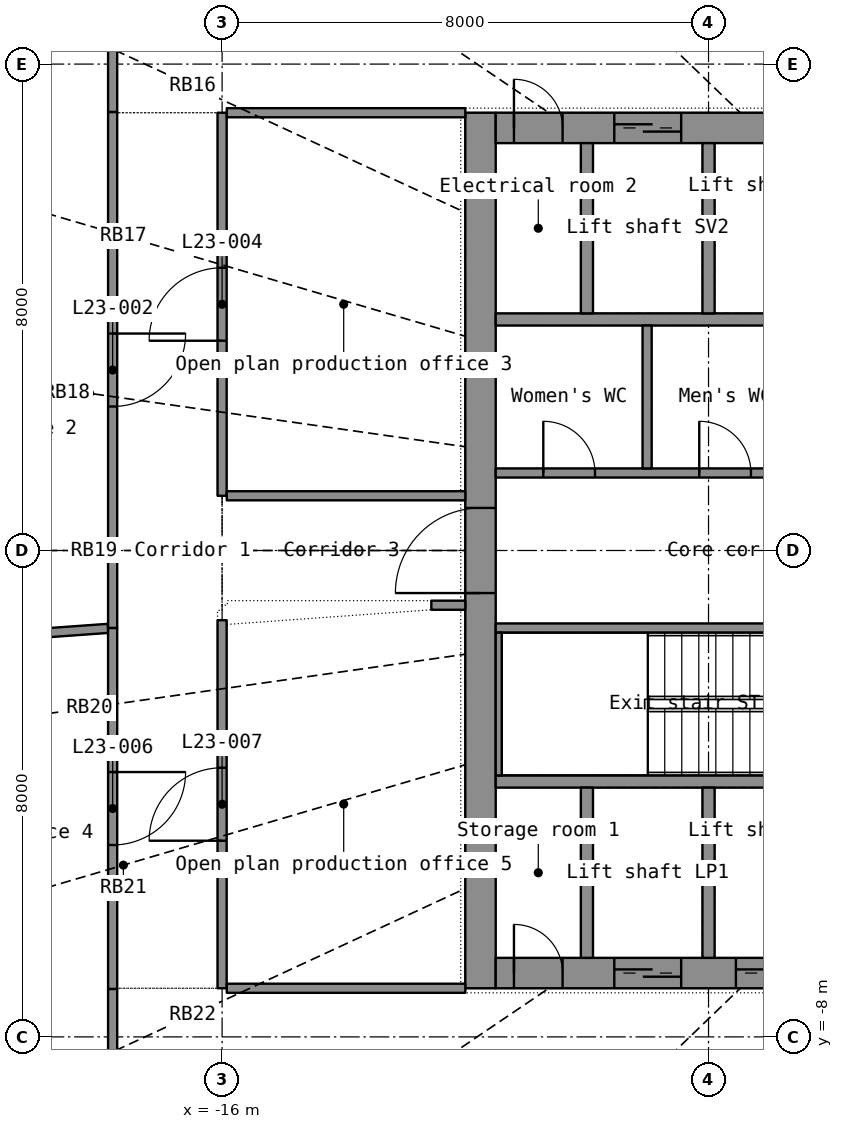
"""IFC4 building model, lengths in metres.
Left out: names, types, materials, properties, quantities, classifications, styles, units other than length and angle.
Written with IfcOpenShell. Run it as: python <this file> out.ifc"""

import sys

from ifc_helpers import new_model, si_unit, direction, frame, frame_2d, origin, place, context, subcontext, project, spatial, rectangle, extrude, element, fill, save


model = new_model("IFC4")
c1 = context("Model", 3, precision=1e-05, world=origin(), true_north=direction((0.0, 1.0)))
c2 = subcontext(c1, "Body", "Model", "MODEL_VIEW")
j1 = project(units=[si_unit("LENGTHUNIT", "METRE"), si_unit("PLANEANGLEUNIT", "RADIAN")], contexts=[c1])
p1 = place(None, origin())
s1 = spatial("IfcSite", under=j1, at=p1, CompositionType="ELEMENT")
p2 = place(p1, origin())
s2 = spatial("IfcBuilding", under=s1, at=p2, CompositionType="ELEMENT")
p3 = place(p2, frame((0.0, 0.0, 100.8)))
s3 = spatial("IfcBuildingStorey", under=s2, at=p3, CompositionType="ELEMENT", Elevation=100.8)
p4 = place(p3, frame((-11.75, -7.2, 0.0), z_axis=(0.0, 0.0, 1.0), x_axis=(0.0, 1.0, 0.0)))
e1 = element("IfcWall", 1, at=p4, inside=s3, PredefinedType="SHEAR", context=c2, shape_type="SweptSolid", body=[
    extrude(rectangle(XDim=14.4, YDim=0.5, at=frame_2d((7.2, 0.0))), origin(), (0.0, 0.0, 1.0), 3.3),
])
p5 = place(p4, frame((6.5, 0.0, 0.0)))
e2 = element("IfcOpeningElement", 2, at=p5, cuts=e1, PredefinedType="OPENING", context=c2, shape_type="SweptSolid", body=[
    extrude(rectangle(XDim=1.4, YDim=2.2, at=frame_2d((0.7, 1.1))), frame((0.0, 0.26, 0.0), z_axis=(0.0, -1.0, 0.0), x_axis=(1.0, 0.0, 0.0)), (0.0, 0.0, 1.0), 0.52),
])
p6 = place(p3, frame((-11.5, -6.95, 0.0), z_axis=(0.0, 0.0, 1.0), x_axis=(1.0, 0.0, 0.0)))
e3 = element("IfcWall", 3, at=p6, inside=s3, PredefinedType="SHEAR", context=c2, shape_type="SweptSolid", body=[
    extrude(rectangle(XDim=23.0, YDim=0.5, at=frame_2d((11.5, 0.0))), origin(), (0.0, 0.0, 1.0), 3.3),
])
p7 = place(p6, frame((1.95, 0.0, 0.0)))
e4 = element("IfcOpeningElement", 4, at=p7, cuts=e3, PredefinedType="OPENING", context=c2, shape_type="SweptSolid", body=[
    extrude(rectangle(XDim=1.1, YDim=2.2, at=frame_2d((0.55, 1.1))), frame((0.0, 0.26, 0.0), z_axis=(0.0, -1.0, 0.0), x_axis=(1.0, 0.0, 0.0)), (0.0, 0.0, 1.0), 0.52),
])
p8 = place(p6, frame((3.95, 0.0, 0.0)))
e5 = element("IfcOpeningElement", 5, at=p8, cuts=e3, PredefinedType="OPENING", context=c2, shape_type="SweptSolid", body=[
    extrude(rectangle(XDim=1.1, YDim=2.2, at=frame_2d((0.55, 1.1))), frame((0.0, 0.26, 0.0), z_axis=(0.0, -1.0, 0.0), x_axis=(1.0, 0.0, 0.0)), (0.0, 0.0, 1.0), 0.52),
])
p9 = place(p6, frame((5.95, 0.0, 0.0)))
e6 = element("IfcOpeningElement", 6, at=p9, cuts=e3, PredefinedType="OPENING", context=c2, shape_type="SweptSolid", body=[
    extrude(rectangle(XDim=1.1, YDim=2.2, at=frame_2d((0.55, 1.1))), frame((0.0, 0.26, 0.0), z_axis=(0.0, -1.0, 0.0), x_axis=(1.0, 0.0, 0.0)), (0.0, 0.0, 1.0), 0.52),
])
p10 = place(p6, frame((7.95, 0.0, 0.0)))
e7 = element("IfcOpeningElement", 7, at=p10, cuts=e3, PredefinedType="OPENING", context=c2, shape_type="SweptSolid", body=[
    extrude(rectangle(XDim=1.1, YDim=2.2, at=frame_2d((0.55, 1.1))), frame((0.0, 0.26, 0.0), z_axis=(0.0, -1.0, 0.0), x_axis=(1.0, 0.0, 0.0)), (0.0, 0.0, 1.0), 0.52),
])
p11 = place(p6, frame((9.95, 0.0, 0.0)))
e8 = element("IfcOpeningElement", 8, at=p11, cuts=e3, PredefinedType="OPENING", context=c2, shape_type="SweptSolid", body=[
    extrude(rectangle(XDim=1.1, YDim=2.2, at=frame_2d((0.55, 1.1))), frame((0.0, 0.26, 0.0), z_axis=(0.0, -1.0, 0.0), x_axis=(1.0, 0.0, 0.0)), (0.0, 0.0, 1.0), 0.52),
])
p12 = place(p6, frame((11.95, 0.0, 0.0)))
e9 = element("IfcOpeningElement", 9, at=p12, cuts=e3, PredefinedType="OPENING", context=c2, shape_type="SweptSolid", body=[
    extrude(rectangle(XDim=1.1, YDim=2.2, at=frame_2d((0.55, 1.1))), frame((0.0, 0.26, 0.0), z_axis=(0.0, -1.0, 0.0), x_axis=(1.0, 0.0, 0.0)), (0.0, 0.0, 1.0), 0.52),
])
p13 = place(p6, frame((13.95, 0.0, 0.0)))
e10 = element("IfcOpeningElement", 10, at=p13, cuts=e3, PredefinedType="OPENING", context=c2, shape_type="SweptSolid", body=[
    extrude(rectangle(XDim=1.1, YDim=2.2, at=frame_2d((0.55, 1.1))), frame((0.0, 0.26, 0.0), z_axis=(0.0, -1.0, 0.0), x_axis=(1.0, 0.0, 0.0)), (0.0, 0.0, 1.0), 0.52),
])
p14 = place(p6, frame((15.95, 0.0, 0.0)))
e11 = element("IfcOpeningElement", 11, at=p14, cuts=e3, PredefinedType="OPENING", context=c2, shape_type="SweptSolid", body=[
    extrude(rectangle(XDim=1.1, YDim=2.2, at=frame_2d((0.55, 1.1))), frame((0.0, 0.26, 0.0), z_axis=(0.0, -1.0, 0.0), x_axis=(1.0, 0.0, 0.0)), (0.0, 0.0, 1.0), 0.52),
])
p15 = place(p6, frame((19.95, 0.0, 0.0)))
e12 = element("IfcOpeningElement", 12, at=p15, cuts=e3, PredefinedType="OPENING", context=c2, shape_type="SweptSolid", body=[
    extrude(rectangle(XDim=1.1, YDim=2.2, at=frame_2d((0.55, 1.1))), frame((0.0, 0.26, 0.0), z_axis=(0.0, -1.0, 0.0), x_axis=(1.0, 0.0, 0.0)), (0.0, 0.0, 1.0), 0.52),
])
p16 = place(p6, frame((0.3, 0.0, 0.0)))
e13 = element("IfcOpeningElement", 13, at=p16, cuts=e3, PredefinedType="OPENING", context=c2, shape_type="SweptSolid", body=[
    extrude(rectangle(XDim=0.8, YDim=2.05, at=frame_2d((0.4, 1.025))), frame((0.0, 0.26, 0.0), z_axis=(0.0, -1.0, 0.0), x_axis=(1.0, 0.0, 0.0)), (0.0, 0.0, 1.0), 0.52),
])
p17 = place(p6, frame((21.9, 0.0, 0.0)))
e14 = element("IfcOpeningElement", 14, at=p17, cuts=e3, PredefinedType="OPENING", context=c2, shape_type="SweptSolid", body=[
    extrude(rectangle(XDim=0.8, YDim=2.05, at=frame_2d((0.4, 1.025))), frame((0.0, 0.26, 0.0), z_axis=(0.0, -1.0, 0.0), x_axis=(1.0, 0.0, 0.0)), (0.0, 0.0, 1.0), 0.52),
])
p18 = place(p3, frame((-11.5, 6.95, 0.0), z_axis=(0.0, 0.0, 1.0), x_axis=(1.0, 0.0, 0.0)))
e15 = element("IfcWall", 15, at=p18, inside=s3, PredefinedType="SHEAR", context=c2, shape_type="SweptSolid", body=[
    extrude(rectangle(XDim=23.0, YDim=0.5, at=frame_2d((11.5, 0.0))), origin(), (0.0, 0.0, 1.0), 3.3),
])
p19 = place(p18, frame((1.95, 0.0, 0.0)))
e16 = element("IfcOpeningElement", 16, at=p19, cuts=e15, PredefinedType="OPENING", context=c2, shape_type="SweptSolid", body=[
    extrude(rectangle(XDim=1.1, YDim=2.2, at=frame_2d((0.55, 1.1))), frame((0.0, 0.26, 0.0), z_axis=(0.0, -1.0, 0.0), x_axis=(1.0, 0.0, 0.0)), (0.0, 0.0, 1.0), 0.52),
])
p20 = place(p18, frame((8.05, 0.0, 0.0)))
e17 = element("IfcOpeningElement", 17, at=p20, cuts=e15, PredefinedType="OPENING", context=c2, shape_type="SweptSolid", body=[
    extrude(rectangle(XDim=0.9, YDim=2.1, at=frame_2d((0.45, 1.05))), frame((0.0, 0.26, 0.0), z_axis=(0.0, -1.0, 0.0), x_axis=(1.0, 0.0, 0.0)), (0.0, 0.0, 1.0), 0.52),
])
p21 = place(p18, frame((16.05, 0.0, 0.0)))
e18 = element("IfcOpeningElement", 18, at=p21, cuts=e15, PredefinedType="OPENING", context=c2, shape_type="SweptSolid", body=[
    extrude(rectangle(XDim=0.9, YDim=2.1, at=frame_2d((0.45, 1.05))), frame((0.0, 0.26, 0.0), z_axis=(0.0, -1.0, 0.0), x_axis=(1.0, 0.0, 0.0)), (0.0, 0.0, 1.0), 0.52),
])
p22 = place(p18, frame((0.3, 0.0, 0.0)))
e19 = element("IfcOpeningElement", 19, at=p22, cuts=e15, PredefinedType="OPENING", context=c2, shape_type="SweptSolid", body=[
    extrude(rectangle(XDim=0.8, YDim=2.05, at=frame_2d((0.4, 1.025))), frame((0.0, 0.26, 0.0), z_axis=(0.0, -1.0, 0.0), x_axis=(1.0, 0.0, 0.0)), (0.0, 0.0, 1.0), 0.52),
])
p23 = place(p18, frame((21.9, 0.0, 0.0)))
e20 = element("IfcOpeningElement", 20, at=p23, cuts=e15, PredefinedType="OPENING", context=c2, shape_type="SweptSolid", body=[
    extrude(rectangle(XDim=0.8, YDim=2.05, at=frame_2d((0.4, 1.025))), frame((0.0, 0.26, 0.0), z_axis=(0.0, -1.0, 0.0), x_axis=(1.0, 0.0, 0.0)), (0.0, 0.0, 1.0), 0.52),
])
for number, where, z_axis, x_axis in (
    (21, (-11.5, -3.8, 0.0), (0.0, 0.0, 1.0), (1.0, 0.0, 0.0)),
    (22, (-11.5, 3.8, 0.0), (0.0, 0.0, 1.0), (1.0, 0.0, 0.0)),
):
    element("IfcWall", number, at=place(p3, frame(where, z_axis=z_axis, x_axis=x_axis)), inside=s3, PredefinedType="SHEAR", context=c2, shape_type="SweptSolid", body=[
        extrude(rectangle(XDim=23.0, YDim=0.2, at=frame_2d((11.5, 0.0))), origin(), (0.0, 0.0, 1.0), 3.3),
    ])
for number, where, z_axis, x_axis in (
    (23, (-10.0, -6.7, 0.0), (0.0, 0.0, 1.0), (0.0, 1.0, 0.0)),
    (24, (-8.0, -6.7, 0.0), (0.0, 0.0, 1.0), (0.0, 1.0, 0.0)),
    (25, (-10.0, 3.9, 0.0), (0.0, 0.0, 1.0), (0.0, 1.0, 0.0)),
    (26, (-8.0, 3.9, 0.0), (0.0, 0.0, 1.0), (0.0, 1.0, 0.0)),
):
    element("IfcWall", number, at=place(p3, frame(where, z_axis=z_axis, x_axis=x_axis)), inside=s3, PredefinedType="SHEAR", context=c2, shape_type="SweptSolid", body=[
        extrude(rectangle(XDim=2.8, YDim=0.2, at=frame_2d((1.4, 0.0))), origin(), (0.0, 0.0, 1.0), 3.3),
    ])
p24 = place(p3, frame((-11.5, -1.275, 0.0), z_axis=(0.0, 0.0, 1.0), x_axis=(1.0, 0.0, 0.0)))
e27 = element("IfcWall", 27, at=p24, inside=s3, PredefinedType="SHEAR", context=c2, shape_type="SweptSolid", body=[
    extrude(rectangle(XDim=8.5, YDim=0.15, at=frame_2d((4.25, 0.0))), origin(), (0.0, 0.0, 1.0), 3.3),
])
p25 = place(p24, frame((5.35, 0.0, 0.0)))
e28 = element("IfcOpeningElement", 28, at=p25, cuts=e27, PredefinedType="OPENING", context=c2, shape_type="SweptSolid", body=[
    extrude(rectangle(XDim=1.1, YDim=2.15, at=frame_2d((0.55, 1.075))), frame((0.0, 0.085, 0.0), z_axis=(0.0, -1.0, 0.0), x_axis=(1.0, 0.0, 0.0)), (0.0, 0.0, 1.0), 0.17),
])
p26 = place(p24, frame((7.15, 0.0, 0.0)))
e29 = element("IfcOpeningElement", 29, at=p26, cuts=e27, PredefinedType="OPENING", context=c2, shape_type="SweptSolid", body=[
    extrude(rectangle(XDim=0.9, YDim=2.1, at=frame_2d((0.45, 1.05))), frame((0.0, 0.085, 0.0), z_axis=(0.0, -1.0, 0.0), x_axis=(1.0, 0.0, 0.0)), (0.0, 0.0, 1.0), 0.17),
])
p27 = place(p3, frame((-11.5, 1.275, 0.0), z_axis=(0.0, 0.0, 1.0), x_axis=(1.0, 0.0, 0.0)))
e30 = element("IfcWall", 30, at=p27, inside=s3, PredefinedType="PARTITIONING", context=c2, shape_type="SweptSolid", body=[
    extrude(rectangle(XDim=8.5, YDim=0.15, at=frame_2d((4.25, 0.0))), origin(), (0.0, 0.0, 1.0), 3.3),
])
p28 = place(p27, frame((0.782, 0.0, 0.0)))
e31 = element("IfcOpeningElement", 31, at=p28, cuts=e30, PredefinedType="OPENING", context=c2, shape_type="SweptSolid", body=[
    extrude(rectangle(XDim=0.85, YDim=2.1, at=frame_2d((0.425, 1.05))), frame((0.0, 0.085, 0.0), z_axis=(0.0, -1.0, 0.0), x_axis=(1.0, 0.0, 0.0)), (0.0, 0.0, 1.0), 0.17),
])
p29 = place(p27, frame((3.347, 0.0, 0.0)))
e32 = element("IfcOpeningElement", 32, at=p29, cuts=e30, PredefinedType="OPENING", context=c2, shape_type="SweptSolid", body=[
    extrude(rectangle(XDim=0.85, YDim=2.1, at=frame_2d((0.425, 1.05))), frame((0.0, 0.085, 0.0), z_axis=(0.0, -1.0, 0.0), x_axis=(1.0, 0.0, 0.0)), (0.0, 0.0, 1.0), 0.17),
])
p30 = place(p27, frame((5.485, 0.0, 0.0)))
e33 = element("IfcOpeningElement", 33, at=p30, cuts=e30, PredefinedType="OPENING", context=c2, shape_type="SweptSolid", body=[
    extrude(rectangle(XDim=0.9, YDim=2.1, at=frame_2d((0.45, 1.05))), frame((0.0, 0.085, 0.0), z_axis=(0.0, -1.0, 0.0), x_axis=(1.0, 0.0, 0.0)), (0.0, 0.0, 1.0), 0.17),
])
p31 = place(p27, frame((7.245, 0.0, 0.0)))
e34 = element("IfcOpeningElement", 34, at=p31, cuts=e30, PredefinedType="OPENING", context=c2, shape_type="SweptSolid", body=[
    extrude(rectangle(XDim=0.9, YDim=2.1, at=frame_2d((0.45, 1.05))), frame((0.0, 0.085, 0.0), z_axis=(0.0, -1.0, 0.0), x_axis=(1.0, 0.0, 0.0)), (0.0, 0.0, 1.0), 0.17),
])
p32 = place(p3, frame((-11.45, -3.7, 0.0), z_axis=(0.0, 0.0, 1.0), x_axis=(0.0, 1.0, 0.0)))
e35 = element("IfcWall", 35, at=p32, inside=s3, PredefinedType="SHEAR", context=c2, shape_type="SweptSolid", body=[
    extrude(rectangle(XDim=2.35, YDim=0.1, at=frame_2d((1.175, 0.0))), origin(), (0.0, 0.0, 1.0), 3.3),
])
p33 = place(p3, frame((-9.01, 1.35, 0.0), z_axis=(0.0, 0.0, 1.0), x_axis=(0.0, 1.0, 0.0)))
e36 = element("IfcWall", 36, at=p33, inside=s3, PredefinedType="PARTITIONING", context=c2, shape_type="SweptSolid", body=[
    extrude(rectangle(XDim=2.35, YDim=0.15, at=frame_2d((1.175, 0.0))), origin(), (0.0, 0.0, 1.0), 3.3),
])
p34 = place(p3, frame((-17.8, 7.212, 0.0), z_axis=(0.0, 0.0, 1.0), x_axis=(0.0, -1.0, 0.0)))
e37 = element("IfcWall", 37, at=p34, inside=s3, PredefinedType="PARTITIONING", context=c2, shape_type="SweptSolid", body=[
    extrude(rectangle(XDim=8.488, YDim=0.15, at=frame_2d((4.244, 0.0))), origin(), (0.0, 0.0, 1.0), 2.4),
])
p35 = place(p34, frame((3.644, 0.0, 0.0)))
e38 = element("IfcOpeningElement", 38, at=p35, cuts=e37, PredefinedType="OPENING", context=c2, shape_type="SweptSolid", body=[
    extrude(rectangle(XDim=1.2, YDim=2.2, at=frame_2d((0.6, 1.1))), frame((0.0, 0.085, 0.0), z_axis=(0.0, -1.0, 0.0), x_axis=(1.0, 0.0, 0.0)), (0.0, 0.0, 1.0), 0.17),
])
p36 = place(p3, frame((-25.771, -1.847, 0.0), z_axis=(0.0, 0.0, 1.0), x_axis=(0.997442231, 0.071477241, 0.0)))
e39 = element("IfcWall", 39, at=p36, inside=s3, PredefinedType="PARTITIONING", context=c2, shape_type="SweptSolid", body=[
    extrude(rectangle(XDim=7.914, YDim=0.15, at=frame_2d((3.957, 0.0))), origin(), (0.0, 0.0, 1.0), 2.4),
])
p37 = place(p3, frame((-16.0, 0.9, 0.0), z_axis=(0.0, 0.0, 1.0), x_axis=(0.0, 1.0, 0.0)))
e40 = element("IfcWall", 40, at=p37, inside=s3, PredefinedType="PARTITIONING", context=c2, shape_type="SweptSolid", body=[
    extrude(rectangle(XDim=6.3, YDim=0.15, at=frame_2d((3.15, 0.0))), origin(), (0.0, 0.0, 1.0), 2.4),
])
p38 = place(p37, frame((2.55, 0.0, 0.0)))
e41 = element("IfcOpeningElement", 41, at=p38, cuts=e40, PredefinedType="OPENING", context=c2, shape_type="SweptSolid", body=[
    extrude(rectangle(XDim=1.2, YDim=2.2, at=frame_2d((0.6, 1.1))), frame((0.0, 0.085, 0.0), z_axis=(0.0, -1.0, 0.0), x_axis=(1.0, 0.0, 0.0)), (0.0, 0.0, 1.0), 0.17),
])
p39 = place(p3, frame((-16.0, -7.2, 0.0), z_axis=(0.0, 0.0, 1.0), x_axis=(0.0, 1.0, 0.0)))
e42 = element("IfcWall", 42, at=p39, inside=s3, PredefinedType="PARTITIONING", context=c2, shape_type="SweptSolid", body=[
    extrude(rectangle(XDim=6.053, YDim=0.15, at=frame_2d((3.027, 0.0))), origin(), (0.0, 0.0, 1.0), 2.4),
])
p40 = place(p39, frame((2.427, 0.0, 0.0)))
e43 = element("IfcOpeningElement", 43, at=p40, cuts=e42, PredefinedType="OPENING", context=c2, shape_type="SweptSolid", body=[
    extrude(rectangle(XDim=1.2, YDim=2.2, at=frame_2d((0.6, 1.1))), frame((0.0, 0.085, 0.0), z_axis=(0.0, -1.0, 0.0), x_axis=(1.0, 0.0, 0.0)), (0.0, 0.0, 1.0), 0.17),
])
p41 = place(p3, frame((-17.8, -1.276, 0.0), z_axis=(0.0, 0.0, 1.0), x_axis=(0.0, -1.0, 0.0)))
e44 = element("IfcWall", 44, at=p41, inside=s3, PredefinedType="PARTITIONING", context=c2, shape_type="SweptSolid", body=[
    extrude(rectangle(XDim=5.936, YDim=0.15, at=frame_2d((2.968, 0.0))), origin(), (0.0, 0.0, 1.0), 2.4),
])
p42 = place(p41, frame((2.368, 0.0, 0.0)))
e45 = element("IfcOpeningElement", 45, at=p42, cuts=e44, PredefinedType="OPENING", context=c2, shape_type="SweptSolid", body=[
    extrude(rectangle(XDim=1.2, YDim=2.2, at=frame_2d((0.6, 1.1))), frame((0.0, 0.085, 0.0), z_axis=(0.0, -1.0, 0.0), x_axis=(1.0, 0.0, 0.0)), (0.0, 0.0, 1.0), 0.17),
])
for number, where, z_axis, x_axis in (
    (46, (-15.923, 7.2, 0.0), (0.0, 0.0, 1.0), (1.0, 0.0, 0.0)),
    (47, (-12.0, -7.2, 0.0), (0.0, 0.0, 1.0), (-1.0, 0.0, 0.0)),
    (48, (-12.0, 0.9, 0.0), (0.0, 0.0, 1.0), (-1.0, 0.0, 0.0)),
):
    element("IfcWall", number, at=place(p3, frame(where, z_axis=z_axis, x_axis=x_axis)), inside=s3, PredefinedType="PARTITIONING", context=c2, shape_type="SweptSolid", body=[
        extrude(rectangle(XDim=3.923, YDim=0.15, at=frame_2d((1.961, 0.0))), origin(), (0.0, 0.0, 1.0), 2.4),
    ])
for number, where, z_axis, x_axis in (
    (49, (-17.8, -7.213, 0.0), (0.0, 0.0, 1.0), (0.0, -1.0, 0.0)),
    (50, (-17.8, 10.123, 0.0), (0.0, 0.0, 1.0), (0.0, -1.0, 0.0)),
):
    element("IfcWall", number, at=place(p3, frame(where, z_axis=z_axis, x_axis=x_axis)), inside=s3, PredefinedType="PARTITIONING", context=c2, shape_type="SweptSolid", body=[
        extrude(rectangle(XDim=2.91, YDim=0.15, at=frame_2d((1.455, 0.0))), origin(), (0.0, 0.0, 1.0), 2.4),
    ])
p43 = place(p3, frame((-12.559, -0.9, 0.0), z_axis=(0.0, 0.0, 1.0), x_axis=(1.0, 0.0, 0.0)))
e51 = element("IfcWall", 51, at=p43, inside=s3, PredefinedType="PARTITIONING", context=c2, shape_type="SweptSolid", body=[
    extrude(rectangle(XDim=0.559, YDim=0.15, at=frame_2d((0.279, 0.0))), origin(), (0.0, 0.0, 1.0), 2.4),
])
p44 = place(p7, origin())
e52 = element("IfcDoor", 52, at=p44, inside=s3, OperationType="DOUBLE_DOOR_SLIDING", PredefinedType="DOOR", context=c2, shape_type="SweptSolid", body=[
    extrude(rectangle(XDim=1.1, YDim=2.2, at=frame_2d((0.55, 1.1))), frame((0.0, 0.025, 0.0), z_axis=(0.0, -1.0, 0.0), x_axis=(1.0, 0.0, 0.0)), (0.0, 0.0, 1.0), 0.05),
])
fill(e4, e52)
p45 = place(p8, origin())
e53 = element("IfcDoor", 53, at=p45, inside=s3, OperationType="DOUBLE_DOOR_SLIDING", PredefinedType="DOOR", context=c2, shape_type="SweptSolid", body=[
    extrude(rectangle(XDim=1.1, YDim=2.2, at=frame_2d((0.55, 1.1))), frame((0.0, 0.025, 0.0), z_axis=(0.0, -1.0, 0.0), x_axis=(1.0, 0.0, 0.0)), (0.0, 0.0, 1.0), 0.05),
])
fill(e5, e53)
p46 = place(p16, origin())
e54 = element("IfcDoor", 54, at=p46, inside=s3, OperationType="SINGLE_SWING_LEFT", PredefinedType="DOOR", context=c2, shape_type="SweptSolid", body=[
    extrude(rectangle(XDim=0.8, YDim=2.05, at=frame_2d((0.4, 1.025))), frame((0.0, 0.025, 0.0), z_axis=(0.0, -1.0, 0.0), x_axis=(1.0, 0.0, 0.0)), (0.0, 0.0, 1.0), 0.05),
])
fill(e13, e54)
p47 = place(p19, origin())
e55 = element("IfcDoor", 55, at=p47, inside=s3, OperationType="DOUBLE_DOOR_SLIDING", PredefinedType="DOOR", context=c2, shape_type="SweptSolid", body=[
    extrude(rectangle(XDim=1.1, YDim=2.2, at=frame_2d((0.55, 1.1))), frame((0.0, 0.025, 0.0), z_axis=(0.0, -1.0, 0.0), x_axis=(1.0, 0.0, 0.0)), (0.0, 0.0, 1.0), 0.05),
])
fill(e16, e55)
p48 = place(p22, origin())
e56 = element("IfcDoor", 56, at=p48, inside=s3, OperationType="SINGLE_SWING_LEFT", PredefinedType="DOOR", context=c2, shape_type="SweptSolid", body=[
    extrude(rectangle(XDim=0.8, YDim=2.05, at=frame_2d((0.4, 1.025))), frame((0.0, 0.025, 0.0), z_axis=(0.0, -1.0, 0.0), x_axis=(1.0, 0.0, 0.0)), (0.0, 0.0, 1.0), 0.05),
])
fill(e19, e56)
p49 = place(p5, origin())
e57 = element("IfcDoor", 57, at=p49, inside=s3, OperationType="DOUBLE_DOOR_SINGLE_SWING", PredefinedType="DOOR", context=c2, shape_type="SweptSolid", body=[
    extrude(rectangle(XDim=1.4, YDim=2.2, at=frame_2d((0.7, 1.1))), frame((0.0, 0.025, 0.0), z_axis=(0.0, -1.0, 0.0), x_axis=(1.0, 0.0, 0.0)), (0.0, 0.0, 1.0), 0.05),
])
fill(e2, e57)
p50 = place(p28, origin())
e58 = element("IfcDoor", 58, at=p50, inside=s3, OperationType="SINGLE_SWING_LEFT", PredefinedType="DOOR", context=c2, shape_type="SweptSolid", body=[
    extrude(rectangle(XDim=0.85, YDim=2.1, at=frame_2d((0.425, 1.05))), frame((0.0, 0.025, 0.0), z_axis=(0.0, -1.0, 0.0), x_axis=(1.0, 0.0, 0.0)), (0.0, 0.0, 1.0), 0.05),
])
fill(e31, e58)
p51 = place(p29, origin())
e59 = element("IfcDoor", 59, at=p51, inside=s3, OperationType="SINGLE_SWING_LEFT", PredefinedType="DOOR", context=c2, shape_type="SweptSolid", body=[
    extrude(rectangle(XDim=0.85, YDim=2.1, at=frame_2d((0.425, 1.05))), frame((0.0, 0.025, 0.0), z_axis=(0.0, -1.0, 0.0), x_axis=(1.0, 0.0, 0.0)), (0.0, 0.0, 1.0), 0.05),
])
fill(e32, e59)
p52 = place(p35, origin())
e60 = element("IfcDoor", 60, at=p52, inside=s3, OperationType="DOUBLE_DOOR_SINGLE_SWING", PredefinedType="DOOR", context=c2, shape_type="SweptSolid", body=[
    extrude(rectangle(XDim=1.2, YDim=2.2, at=frame_2d((0.6, 1.1))), frame((0.0, 0.025, 0.0), z_axis=(0.0, -1.0, 0.0), x_axis=(1.0, 0.0, 0.0)), (0.0, 0.0, 1.0), 0.05),
])
fill(e38, e60)
p53 = place(p38, origin())
e61 = element("IfcDoor", 61, at=p53, inside=s3, OperationType="DOUBLE_DOOR_SINGLE_SWING", PredefinedType="DOOR", context=c2, shape_type="SweptSolid", body=[
    extrude(rectangle(XDim=1.2, YDim=2.2, at=frame_2d((0.6, 1.1))), frame((0.0, 0.025, 0.0), z_axis=(0.0, -1.0, 0.0), x_axis=(1.0, 0.0, 0.0)), (0.0, 0.0, 1.0), 0.05),
])
fill(e41, e61)
p54 = place(p42, origin())
e62 = element("IfcDoor", 62, at=p54, inside=s3, OperationType="DOUBLE_DOOR_SINGLE_SWING", PredefinedType="DOOR", context=c2, shape_type="SweptSolid", body=[
    extrude(rectangle(XDim=1.2, YDim=2.2, at=frame_2d((0.6, 1.1))), frame((0.0, 0.025, 0.0), z_axis=(0.0, -1.0, 0.0), x_axis=(1.0, 0.0, 0.0)), (0.0, 0.0, 1.0), 0.05),
])
fill(e45, e62)
p55 = place(p40, origin())
e63 = element("IfcDoor", 63, at=p55, inside=s3, OperationType="DOUBLE_DOOR_SINGLE_SWING", PredefinedType="DOOR", context=c2, shape_type="SweptSolid", body=[
    extrude(rectangle(XDim=1.2, YDim=2.2, at=frame_2d((0.6, 1.1))), frame((0.0, 0.025, 0.0), z_axis=(0.0, -1.0, 0.0), x_axis=(1.0, 0.0, 0.0)), (0.0, 0.0, 1.0), 0.05),
])
fill(e43, e63)
save(model, sys.argv[1])
